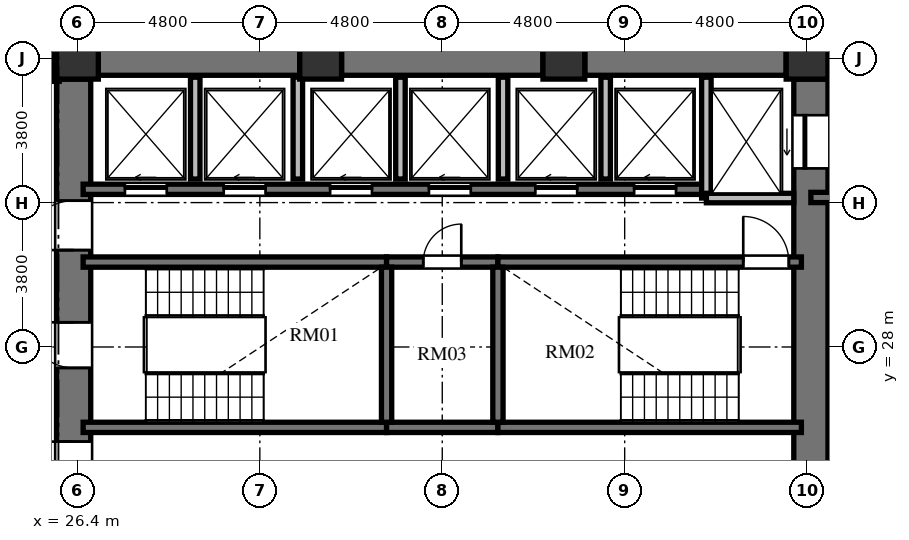
"""IFC4 building model, lengths in metres.
Left out: names, types, materials, properties, quantities, classifications, styles, units other than length and angle.
Written with IfcOpenShell. Run it as: python <this file> out.ifc"""

import sys

from ifc_helpers import new_model, si_unit, direction, frame, frame_2d, origin, origin_2d, place, context, subcontext, project, spatial, rectangle, extrude, element, fill, save


model = new_model("IFC4")
c1 = context("Model", 3, precision=1e-05, world=origin(), true_north=direction((0.0, 1.0)))
c2 = subcontext(c1, "Body", "Model", "MODEL_VIEW")
j1 = project(units=[si_unit("LENGTHUNIT", "METRE"), si_unit("PLANEANGLEUNIT", "RADIAN")], contexts=[c1])
p1 = place(None, origin())
s1 = spatial("IfcSite", under=j1, at=p1, CompositionType="ELEMENT")
p2 = place(p1, origin())
s2 = spatial("IfcBuilding", under=s1, at=p2, CompositionType="ELEMENT")
p3 = place(p2, frame((0.0, 0.0, 50.736)))
s3 = spatial("IfcBuildingStorey", under=s2, at=p3, CompositionType="ELEMENT", Elevation=50.736)
for number, where, z_axis, x_axis in (
    (1, (45.6, 35.6, 0.0), (0.0, 0.0, 1.0), (1.0, 0.0, 0.0)),
    (2, (39.2, 35.6, 0.0), (0.0, 0.0, 1.0), (1.0, 0.0, 0.0)),
    (3, (32.8, 35.6, 0.0), (0.0, 0.0, 1.0), (1.0, 0.0, 0.0)),
    (4, (26.4, 35.6, 0.0), (0.0, 0.0, 1.0), (1.0, 0.0, 0.0)),
):
    element("IfcColumn", number, at=place(p3, frame(where, z_axis=z_axis, x_axis=x_axis)), inside=s3, PredefinedType="COLUMN", context=c2, shape_type="SweptSolid", body=[
        extrude(rectangle(XDim=1.1, YDim=1.1, at=origin_2d()), origin(), (0.0, 0.0, 1.0), 3.648),
    ])
p4 = place(p3, frame((26.3, 20.95, 0.0), z_axis=(0.0, 0.0, 1.0), x_axis=(0.0, 1.0, 0.0)))
e5 = element("IfcWall", 5, at=p4, inside=s3, PredefinedType="SHEAR", context=c2, shape_type="SweptSolid", body=[
    extrude(rectangle(XDim=14.1, YDim=0.9, at=frame_2d((7.05, 0.0))), origin(), (0.0, 0.0, 1.0), 3.648),
])
p5 = place(p4, frame((6.5, 0.0, 0.0)))
e6 = element("IfcOpeningElement", 6, at=p5, cuts=e5, PredefinedType="OPENING", context=c2, shape_type="SweptSolid", body=[
    extrude(rectangle(XDim=1.2, YDim=2.15, at=frame_2d((0.6, 1.075))), frame((0.0, 0.46, 0.0), z_axis=(0.0, -1.0, 0.0), x_axis=(1.0, 0.0, 0.0)), (0.0, 0.0, 1.0), 0.92),
])
p6 = place(p4, frame((9.6, 0.0, 0.0)))
e7 = element("IfcOpeningElement", 7, at=p6, cuts=e5, PredefinedType="OPENING", context=c2, shape_type="SweptSolid", body=[
    extrude(rectangle(XDim=1.3, YDim=2.2, at=frame_2d((0.65, 1.1))), frame((0.0, 0.46, 0.0), z_axis=(0.0, -1.0, 0.0), x_axis=(1.0, 0.0, 0.0)), (0.0, 0.0, 1.0), 0.92),
])
p7 = place(p4, frame((3.26, 0.0, 0.0)))
e8 = element("IfcOpeningElement", 8, at=p7, cuts=e5, PredefinedType="OPENING", context=c2, shape_type="SweptSolid", body=[
    extrude(rectangle(XDim=1.3, YDim=2.2, at=frame_2d((0.65, 1.1))), frame((0.0, 0.46, 0.0), z_axis=(0.0, -1.0, 0.0), x_axis=(1.0, 0.0, 0.0)), (0.0, 0.0, 1.0), 0.92),
])
p8 = place(p3, frame((45.7, 20.95, 0.0), z_axis=(0.0, 0.0, 1.0), x_axis=(0.0, 1.0, 0.0)))
e9 = element("IfcWall", 9, at=p8, inside=s3, PredefinedType="SHEAR", context=c2, shape_type="SweptSolid", body=[
    extrude(rectangle(XDim=14.1, YDim=0.9, at=frame_2d((7.05, 0.0))), origin(), (0.0, 0.0, 1.0), 3.648),
])
p9 = place(p8, frame((11.75, 0.0, 0.0)))
e10 = element("IfcOpeningElement", 10, at=p9, cuts=e9, PredefinedType="OPENING", context=c2, shape_type="SweptSolid", body=[
    extrude(rectangle(XDim=1.4, YDim=2.3, at=frame_2d((0.7, 1.15))), frame((0.0, 0.46, 0.0), z_axis=(0.0, -1.0, 0.0), x_axis=(1.0, 0.0, 0.0)), (0.0, 0.0, 1.0), 0.92),
])
p10 = place(p8, frame((0.95, 0.0, 0.0)))
e11 = element("IfcOpeningElement", 11, at=p10, cuts=e9, PredefinedType="OPENING", context=c2, shape_type="SweptSolid", body=[
    extrude(rectangle(XDim=1.4, YDim=2.3, at=frame_2d((0.7, 1.15))), frame((0.0, 0.46, 0.0), z_axis=(0.0, -1.0, 0.0), x_axis=(1.0, 0.0, 0.0)), (0.0, 0.0, 1.0), 0.92),
])
p11 = place(p3, frame((26.95, 35.6, 0.0), z_axis=(0.0, 0.0, 1.0), x_axis=(1.0, 0.0, 0.0)))
e12 = element("IfcWall", 12, at=p11, inside=s3, PredefinedType="SHEAR", context=c2, shape_type="SweptSolid", body=[
    extrude(rectangle(XDim=5.3, YDim=0.9, at=frame_2d((2.65, 0.0))), origin(), (0.0, 0.0, 1.0), 3.648),
])
p12 = place(p3, frame((33.35, 35.6, 0.0), z_axis=(0.0, 0.0, 1.0), x_axis=(1.0, 0.0, 0.0)))
e13 = element("IfcWall", 13, at=p12, inside=s3, PredefinedType="SHEAR", context=c2, shape_type="SweptSolid", body=[
    extrude(rectangle(XDim=5.3, YDim=0.9, at=frame_2d((2.65, 0.0))), origin(), (0.0, 0.0, 1.0), 3.648),
])
p13 = place(p3, frame((39.75, 35.6, 0.0), z_axis=(0.0, 0.0, 1.0), x_axis=(1.0, 0.0, 0.0)))
e14 = element("IfcWall", 14, at=p13, inside=s3, PredefinedType="SHEAR", context=c2, shape_type="SweptSolid", body=[
    extrude(rectangle(XDim=5.3, YDim=0.9, at=frame_2d((2.65, 0.0))), origin(), (0.0, 0.0, 1.0), 3.648),
])
p14 = place(p3, frame((26.55, 30.235, 0.0), z_axis=(0.0, 0.0, 1.0), x_axis=(1.0, 0.0, 0.0)))
e15 = element("IfcWall", 15, at=p14, inside=s3, PredefinedType="SHEAR", context=c2, shape_type="SweptSolid", body=[
    extrude(rectangle(XDim=7.985, YDim=0.27, at=frame_2d((3.992, 0.0))), origin(), (0.0, 0.0, 1.0), 3.648),
])
p15 = place(p3, frame((34.535, 30.235, 0.0), z_axis=(0.0, 0.0, 1.0), x_axis=(1.0, 0.0, 0.0)))
e16 = element("IfcWall", 16, at=p15, inside=s3, PredefinedType="SHEAR", context=c2, shape_type="SweptSolid", body=[
    extrude(rectangle(XDim=2.93, YDim=0.27, at=frame_2d((1.465, 0.0))), origin(), (0.0, 0.0, 1.0), 3.648),
])
p16 = place(p15, frame((0.965, 0.0, 0.0)))
e17 = element("IfcOpeningElement", 17, at=p16, cuts=e16, PredefinedType="OPENING", context=c2, shape_type="SweptSolid", body=[
    extrude(rectangle(XDim=1.0, YDim=2.1, at=frame_2d((0.5, 1.05))), frame((0.0, 0.145, 0.0), z_axis=(0.0, -1.0, 0.0), x_axis=(1.0, 0.0, 0.0)), (0.0, 0.0, 1.0), 0.29),
])
p17 = place(p3, frame((37.465, 30.235, 0.0), z_axis=(0.0, 0.0, 1.0), x_axis=(1.0, 0.0, 0.0)))
e18 = element("IfcWall", 18, at=p17, inside=s3, PredefinedType="SHEAR", context=c2, shape_type="SweptSolid", body=[
    extrude(rectangle(XDim=7.985, YDim=0.27, at=frame_2d((3.992, 0.0))), origin(), (0.0, 0.0, 1.0), 3.648),
])
p18 = place(p17, frame((6.455, 0.0, 0.0)))
e19 = element("IfcOpeningElement", 19, at=p18, cuts=e18, PredefinedType="OPENING", context=c2, shape_type="SweptSolid", body=[
    extrude(rectangle(XDim=1.2, YDim=2.15, at=frame_2d((0.6, 1.075))), frame((0.0, 0.145, 0.0), z_axis=(0.0, -1.0, 0.0), x_axis=(1.0, 0.0, 0.0)), (0.0, 0.0, 1.0), 0.29),
])
p19 = place(p3, frame((26.55, 25.885, 0.0), z_axis=(0.0, 0.0, 1.0), x_axis=(1.0, 0.0, 0.0)))
e20 = element("IfcWall", 20, at=p19, inside=s3, PredefinedType="SHEAR", context=c2, shape_type="SweptSolid", body=[
    extrude(rectangle(XDim=7.985, YDim=0.27, at=frame_2d((3.992, 0.0))), origin(), (0.0, 0.0, 1.0), 3.648),
])
p20 = place(p3, frame((34.535, 25.885, 0.0), z_axis=(0.0, 0.0, 1.0), x_axis=(1.0, 0.0, 0.0)))
e21 = element("IfcWall", 21, at=p20, inside=s3, PredefinedType="SHEAR", context=c2, shape_type="SweptSolid", body=[
    extrude(rectangle(XDim=2.93, YDim=0.27, at=frame_2d((1.465, 0.0))), origin(), (0.0, 0.0, 1.0), 3.648),
])
p21 = place(p3, frame((37.465, 25.885, 0.0), z_axis=(0.0, 0.0, 1.0), x_axis=(1.0, 0.0, 0.0)))
e22 = element("IfcWall", 22, at=p21, inside=s3, PredefinedType="SHEAR", context=c2, shape_type="SweptSolid", body=[
    extrude(rectangle(XDim=7.985, YDim=0.27, at=frame_2d((3.992, 0.0))), origin(), (0.0, 0.0, 1.0), 3.648),
])
for number, where, z_axis, x_axis in (
    (23, (34.535, 26.02, 0.0), (0.0, 0.0, 1.0), (0.0, 1.0, 0.0)),
    (24, (37.465, 26.02, 0.0), (0.0, 0.0, 1.0), (0.0, 1.0, 0.0)),
):
    element("IfcWall", number, at=place(p3, frame(where, z_axis=z_axis, x_axis=x_axis)), inside=s3, PredefinedType="SHEAR", context=c2, shape_type="SweptSolid", body=[
        extrude(rectangle(XDim=4.08, YDim=0.27, at=frame_2d((2.04, 0.0))), origin(), (0.0, 0.0, 1.0), 3.648),
    ])
p22 = place(p3, frame((26.55, 32.15, 0.0), z_axis=(0.0, 0.0, 1.0), x_axis=(1.0, 0.0, 0.0)))
e25 = element("IfcWall", 25, at=p22, inside=s3, PredefinedType="SHEAR", context=c2, shape_type="SweptSolid", body=[
    extrude(rectangle(XDim=16.4, YDim=0.27, at=frame_2d((8.2, 0.0))), origin(), (0.0, 0.0, 1.0), 3.648),
])
p23 = place(p22, frame((1.1, 0.0, 0.0)))
e26 = element("IfcOpeningElement", 26, at=p23, cuts=e25, PredefinedType="OPENING", context=c2, shape_type="SweptSolid", body=[
    extrude(rectangle(XDim=1.1, YDim=2.2, at=frame_2d((0.55, 1.1))), frame((0.0, 0.145, 0.0), z_axis=(0.0, -1.0, 0.0), x_axis=(1.0, 0.0, 0.0)), (0.0, 0.0, 1.0), 0.29),
])
p24 = place(p22, frame((3.7, 0.0, 0.0)))
e27 = element("IfcOpeningElement", 27, at=p24, cuts=e25, PredefinedType="OPENING", context=c2, shape_type="SweptSolid", body=[
    extrude(rectangle(XDim=1.1, YDim=2.2, at=frame_2d((0.55, 1.1))), frame((0.0, 0.145, 0.0), z_axis=(0.0, -1.0, 0.0), x_axis=(1.0, 0.0, 0.0)), (0.0, 0.0, 1.0), 0.29),
])
p25 = place(p22, frame((6.5, 0.0, 0.0)))
e28 = element("IfcOpeningElement", 28, at=p25, cuts=e25, PredefinedType="OPENING", context=c2, shape_type="SweptSolid", body=[
    extrude(rectangle(XDim=1.1, YDim=2.2, at=frame_2d((0.55, 1.1))), frame((0.0, 0.145, 0.0), z_axis=(0.0, -1.0, 0.0), x_axis=(1.0, 0.0, 0.0)), (0.0, 0.0, 1.0), 0.29),
])
p26 = place(p22, frame((9.1, 0.0, 0.0)))
e29 = element("IfcOpeningElement", 29, at=p26, cuts=e25, PredefinedType="OPENING", context=c2, shape_type="SweptSolid", body=[
    extrude(rectangle(XDim=1.1, YDim=2.2, at=frame_2d((0.55, 1.1))), frame((0.0, 0.145, 0.0), z_axis=(0.0, -1.0, 0.0), x_axis=(1.0, 0.0, 0.0)), (0.0, 0.0, 1.0), 0.29),
])
p27 = place(p22, frame((11.9, 0.0, 0.0)))
e30 = element("IfcOpeningElement", 30, at=p27, cuts=e25, PredefinedType="OPENING", context=c2, shape_type="SweptSolid", body=[
    extrude(rectangle(XDim=1.1, YDim=2.2, at=frame_2d((0.55, 1.1))), frame((0.0, 0.145, 0.0), z_axis=(0.0, -1.0, 0.0), x_axis=(1.0, 0.0, 0.0)), (0.0, 0.0, 1.0), 0.29),
])
p28 = place(p22, frame((14.5, 0.0, 0.0)))
e31 = element("IfcOpeningElement", 31, at=p28, cuts=e25, PredefinedType="OPENING", context=c2, shape_type="SweptSolid", body=[
    extrude(rectangle(XDim=1.1, YDim=2.2, at=frame_2d((0.55, 1.1))), frame((0.0, 0.145, 0.0), z_axis=(0.0, -1.0, 0.0), x_axis=(1.0, 0.0, 0.0)), (0.0, 0.0, 1.0), 0.29),
])
p29 = place(p3, frame((42.95, 31.92, 0.0), z_axis=(0.0, 0.0, 1.0), x_axis=(0.0, 1.0, 0.0)))
e32 = element("IfcWall", 32, at=p29, inside=s3, PredefinedType="SOLIDWALL", context=c2, shape_type="SweptSolid", body=[
    extrude(rectangle(XDim=3.18, YDim=0.25, at=frame_2d((1.59, 0.0))), origin(), (0.0, 0.0, 1.0), 3.428),
])
p30 = place(p3, frame((42.95, 31.92, 0.0), z_axis=(0.0, 0.0, 1.0), x_axis=(1.0, 0.0, 0.0)))
e33 = element("IfcWall", 33, at=p30, inside=s3, PredefinedType="SOLIDWALL", context=c2, shape_type="SweptSolid", body=[
    extrude(rectangle(XDim=2.3, YDim=0.25, at=frame_2d((1.15, 0.0))), origin(), (0.0, 0.0, 1.0), 3.428),
])
for number, where, z_axis, x_axis in (
    (34, (29.5, 32.42, 0.0), (0.0, 0.0, 1.0), (0.0, 1.0, 0.0)),
    (35, (32.2, 32.42, 0.0), (0.0, 0.0, 1.0), (0.0, 1.0, 0.0)),
    (36, (34.9, 32.42, 0.0), (0.0, 0.0, 1.0), (0.0, 1.0, 0.0)),
    (37, (37.6, 32.42, 0.0), (0.0, 0.0, 1.0), (0.0, 1.0, 0.0)),
    (38, (40.3, 32.42, 0.0), (0.0, 0.0, 1.0), (0.0, 1.0, 0.0)),
):
    element("IfcWall", number, at=place(p3, frame(where, z_axis=z_axis, x_axis=x_axis)), inside=s3, PredefinedType="SOLIDWALL", context=c2, shape_type="SweptSolid", body=[
        extrude(rectangle(XDim=2.68, YDim=0.25, at=frame_2d((1.34, 0.0))), origin(), (0.0, 0.0, 1.0), 3.428),
    ])
p31 = place(p3, frame((45.7, 31.935, 0.0), z_axis=(0.0, 0.0, 1.0), x_axis=(1.0, 0.0, 0.0)))
e39 = element("IfcWall", 39, at=p31, inside=s3, PredefinedType="SHEAR", context=c2, shape_type="SweptSolid", body=[
    extrude(rectangle(XDim=4.715, YDim=0.27, at=frame_2d((2.357, 0.0))), origin(), (0.0, 0.0, 1.0), 3.648),
])
p32 = place(p3, frame((25.83, 36.21, 0.0), z_axis=(0.0, 0.0, 1.0), x_axis=(0.0, -1.0, 0.0)))
e40 = element("IfcWall", 40, at=p32, inside=s3, PredefinedType="PARTITIONING", context=c2, shape_type="SweptSolid", body=[
    extrude(rectangle(XDim=1.22, YDim=0.18, at=frame_2d((0.61, 0.0))), origin(), (0.0, 0.0, 1.0), 3.428),
])
p33 = place(p5, origin())
e41 = element("IfcDoor", 41, at=p33, inside=s3, OperationType="SINGLE_SWING_RIGHT", PredefinedType="DOOR", context=c2, shape_type="SweptSolid", body=[
    extrude(rectangle(XDim=1.2, YDim=2.15, at=frame_2d((0.6, 1.075))), frame((0.0, 0.025, 0.0), z_axis=(0.0, -1.0, 0.0), x_axis=(1.0, 0.0, 0.0)), (0.0, 0.0, 1.0), 0.05),
])
fill(e6, e41)
p34 = place(p18, origin())
e42 = element("IfcDoor", 42, at=p34, inside=s3, OperationType="SINGLE_SWING_LEFT", PredefinedType="DOOR", context=c2, shape_type="SweptSolid", body=[
    extrude(rectangle(XDim=1.2, YDim=2.15, at=frame_2d((0.6, 1.075))), frame((0.0, 0.025, 0.0), z_axis=(0.0, -1.0, 0.0), x_axis=(1.0, 0.0, 0.0)), (0.0, 0.0, 1.0), 0.05),
])
fill(e19, e42)
p35 = place(p16, origin())
e43 = element("IfcDoor", 43, at=p35, inside=s3, OperationType="SINGLE_SWING_RIGHT", PredefinedType="DOOR", context=c2, shape_type="SweptSolid", body=[
    extrude(rectangle(XDim=1.0, YDim=2.1, at=frame_2d((0.5, 1.05))), frame((0.0, 0.025, 0.0), z_axis=(0.0, -1.0, 0.0), x_axis=(1.0, 0.0, 0.0)), (0.0, 0.0, 1.0), 0.05),
])
fill(e17, e43)
p36 = place(p6, origin())
e44 = element("IfcDoor", 44, at=p36, inside=s3, OperationType="SINGLE_SWING_LEFT", PredefinedType="DOOR", context=c2, shape_type="SweptSolid", body=[
    extrude(rectangle(XDim=1.3, YDim=2.2, at=frame_2d((0.65, 1.1))), frame((0.0, 0.025, 0.0), z_axis=(0.0, -1.0, 0.0), x_axis=(1.0, 0.0, 0.0)), (0.0, 0.0, 1.0), 0.05),
])
fill(e7, e44)
p37 = place(p7, origin())
e45 = element("IfcDoor", 45, at=p37, inside=s3, OperationType="SINGLE_SWING_RIGHT", PredefinedType="DOOR", context=c2, shape_type="SweptSolid", body=[
    extrude(rectangle(XDim=1.3, YDim=2.2, at=frame_2d((0.65, 1.1))), frame((0.0, 0.025, 0.0), z_axis=(0.0, -1.0, 0.0), x_axis=(1.0, 0.0, 0.0)), (0.0, 0.0, 1.0), 0.05),
])
fill(e8, e45)
p38 = place(p23, origin())
e46 = element("IfcDoor", 46, at=p38, inside=s3, OperationType="SLIDING_TO_LEFT", PredefinedType="DOOR", context=c2, shape_type="SweptSolid", body=[
    extrude(rectangle(XDim=1.1, YDim=2.2, at=frame_2d((0.55, 1.1))), frame((0.0, 0.025, 0.0), z_axis=(0.0, -1.0, 0.0), x_axis=(1.0, 0.0, 0.0)), (0.0, 0.0, 1.0), 0.05),
])
fill(e26, e46)
p39 = place(p24, origin())
e47 = element("IfcDoor", 47, at=p39, inside=s3, OperationType="SLIDING_TO_LEFT", PredefinedType="DOOR", context=c2, shape_type="SweptSolid", body=[
    extrude(rectangle(XDim=1.1, YDim=2.2, at=frame_2d((0.55, 1.1))), frame((0.0, 0.025, 0.0), z_axis=(0.0, -1.0, 0.0), x_axis=(1.0, 0.0, 0.0)), (0.0, 0.0, 1.0), 0.05),
])
fill(e27, e47)
p40 = place(p25, origin())
e48 = element("IfcDoor", 48, at=p40, inside=s3, OperationType="SLIDING_TO_LEFT", PredefinedType="DOOR", context=c2, shape_type="SweptSolid", body=[
    extrude(rectangle(XDim=1.1, YDim=2.2, at=frame_2d((0.55, 1.1))), frame((0.0, 0.025, 0.0), z_axis=(0.0, -1.0, 0.0), x_axis=(1.0, 0.0, 0.0)), (0.0, 0.0, 1.0), 0.05),
])
fill(e28, e48)
p41 = place(p26, origin())
e49 = element("IfcDoor", 49, at=p41, inside=s3, OperationType="SLIDING_TO_LEFT", PredefinedType="DOOR", context=c2, shape_type="SweptSolid", body=[
    extrude(rectangle(XDim=1.1, YDim=2.2, at=frame_2d((0.55, 1.1))), frame((0.0, 0.025, 0.0), z_axis=(0.0, -1.0, 0.0), x_axis=(1.0, 0.0, 0.0)), (0.0, 0.0, 1.0), 0.05),
])
fill(e29, e49)
p42 = place(p27, origin())
e50 = element("IfcDoor", 50, at=p42, inside=s3, OperationType="SLIDING_TO_LEFT", PredefinedType="DOOR", context=c2, shape_type="SweptSolid", body=[
    extrude(rectangle(XDim=1.1, YDim=2.2, at=frame_2d((0.55, 1.1))), frame((0.0, 0.025, 0.0), z_axis=(0.0, -1.0, 0.0), x_axis=(1.0, 0.0, 0.0)), (0.0, 0.0, 1.0), 0.05),
])
fill(e30, e50)
p43 = place(p28, origin())
e51 = element("IfcDoor", 51, at=p43, inside=s3, OperationType="SLIDING_TO_LEFT", PredefinedType="DOOR", context=c2, shape_type="SweptSolid", body=[
    extrude(rectangle(XDim=1.1, YDim=2.2, at=frame_2d((0.55, 1.1))), frame((0.0, 0.025, 0.0), z_axis=(0.0, -1.0, 0.0), x_axis=(1.0, 0.0, 0.0)), (0.0, 0.0, 1.0), 0.05),
])
fill(e31, e51)
p44 = place(p9, origin())
e52 = element("IfcDoor", 52, at=p44, inside=s3, OperationType="SLIDING_TO_LEFT", PredefinedType="DOOR", context=c2, shape_type="SweptSolid", body=[
    extrude(rectangle(XDim=1.4, YDim=2.3, at=frame_2d((0.7, 1.15))), frame((0.0, 0.025, 0.0), z_axis=(0.0, -1.0, 0.0), x_axis=(1.0, 0.0, 0.0)), (0.0, 0.0, 1.0), 0.05),
])
fill(e10, e52)
save(model, sys.argv[1])
